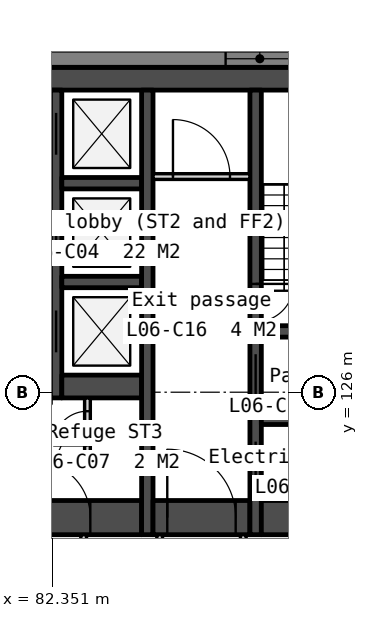
"""IFC4 building model, lengths in metres.
Left out: names, types, materials, properties, quantities, classifications, styles, units other than length and angle.
Written with IfcOpenShell. Run it as: python <this file> out.ifc"""

import sys

from ifc_helpers import new_model, si_unit, direction, frame, frame_2d, origin, place, context, subcontext, project, spatial, polyline, rectangle, outline, extrude, element, fill, save


model = new_model("IFC4")
c1 = context("Model", 3, precision=1e-05, world=origin(), true_north=direction((0.0, 1.0)))
c2 = subcontext(c1, "Body", "Model", "MODEL_VIEW")
j1 = project(units=[si_unit("LENGTHUNIT", "METRE"), si_unit("PLANEANGLEUNIT", "RADIAN")], contexts=[c1])
p1 = place(None, origin())
s1 = spatial("IfcSite", under=j1, at=p1, CompositionType="ELEMENT")
p2 = place(p1, origin())
s2 = spatial("IfcBuilding", under=s1, at=p2, CompositionType="ELEMENT")
p3 = place(p2, frame((0.0, 0.0, 35.0)))
s3 = spatial("IfcBuildingStorey", under=s2, at=p3, CompositionType="ELEMENT", Elevation=35.0)
p4 = place(p3, frame((66.0, 134.25, 0.0), z_axis=(0.0, 0.0, 1.0), x_axis=(1.0, 0.0, 0.0)))
e1 = element("IfcWall", 1, at=p4, inside=s3, PredefinedType="SOLIDWALL", context=c2, shape_type="SweptSolid", body=[
    extrude(rectangle(XDim=28.0, YDim=0.6, at=frame_2d((14.0, 0.0))), origin(), (0.0, 0.0, 1.0), 3.35),
])
p5 = place(p3, frame((81.8, 122.7, 0.0), z_axis=(0.0, 0.0, 1.0), x_axis=(1.0, 0.0, 0.0)))
e2 = element("IfcWall", 2, at=p5, inside=s3, PredefinedType="SOLIDWALL", context=c2, shape_type="SweptSolid", body=[
    extrude(rectangle(XDim=2.9, YDim=0.9, at=frame_2d((1.45, 0.0))), origin(), (0.0, 0.0, 1.0), 3.35),
])
p6 = place(p5, frame((0.05, 0.0, 0.0)))
e3 = element("IfcOpeningElement", 3, at=p6, cuts=e2, PredefinedType="OPENING", context=c2, shape_type="SweptSolid", body=[
    extrude(rectangle(XDim=1.5, YDim=2.1, at=frame_2d((0.75, 1.05))), frame((0.0, 0.46, 0.0), z_axis=(0.0, -1.0, 0.0), x_axis=(1.0, 0.0, 0.0)), (0.0, 0.0, 1.0), 0.92),
])
p7 = place(p3, frame((82.45, 133.95, 0.0), z_axis=(0.0, 0.0, 1.0), x_axis=(0.0, -1.0, 0.0)))
e4 = element("IfcWall", 4, at=p7, inside=s3, PredefinedType="SOLIDWALL", context=c2, shape_type="SweptSolid", body=[
    extrude(rectangle(XDim=8.1, YDim=0.3, at=frame_2d((4.05, 0.0))), origin(), (0.0, 0.0, 1.0), 3.35),
])
p8 = place(p7, frame((0.6, 0.0, 0.0)))
e5 = element("IfcOpeningElement", 5, at=p8, cuts=e4, PredefinedType="OPENING", context=c2, shape_type="SweptSolid", body=[
    extrude(rectangle(XDim=1.1, YDim=2.1, at=frame_2d((0.55, 1.05))), frame((0.0, 0.16, 0.0), z_axis=(0.0, -1.0, 0.0), x_axis=(1.0, 0.0, 0.0)), (0.0, 0.0, 1.0), 0.32),
])
p9 = place(p7, frame((3.2, 0.0, 0.0)))
e6 = element("IfcOpeningElement", 6, at=p9, cuts=e4, PredefinedType="OPENING", context=c2, shape_type="SweptSolid", body=[
    extrude(rectangle(XDim=1.1, YDim=2.1, at=frame_2d((0.55, 1.05))), frame((0.0, 0.16, 0.0), z_axis=(0.0, -1.0, 0.0), x_axis=(1.0, 0.0, 0.0)), (0.0, 0.0, 1.0), 0.32),
])
p10 = place(p7, frame((5.8, 0.0, 0.0)))
e7 = element("IfcOpeningElement", 7, at=p10, cuts=e4, PredefinedType="OPENING", context=c2, shape_type="SweptSolid", body=[
    extrude(rectangle(XDim=1.1, YDim=2.1, at=frame_2d((0.55, 1.05))), frame((0.0, 0.16, 0.0), z_axis=(0.0, -1.0, 0.0), x_axis=(1.0, 0.0, 0.0)), (0.0, 0.0, 1.0), 0.32),
])
for number, where, z_axis, x_axis in (
    (8, (82.6, 131.5, 0.0), (0.0, 0.0, 1.0), (1.0, 0.0, 0.0)),
    (9, (82.6, 128.9, 0.0), (0.0, 0.0, 1.0), (1.0, 0.0, 0.0)),
):
    element("IfcWall", number, at=place(p3, frame(where, z_axis=z_axis, x_axis=x_axis)), inside=s3, PredefinedType="SOLIDWALL", context=c2, shape_type="SweptSolid", body=[
        extrude(rectangle(XDim=2.1, YDim=0.3, at=frame_2d((1.05, 0.0))), origin(), (0.0, 0.0, 1.0), 3.35),
    ])
p11 = place(p3, frame((82.6, 126.15, 0.0), z_axis=(0.0, 0.0, 1.0), x_axis=(1.0, 0.0, 0.0)))
e10 = element("IfcWall", 10, at=p11, inside=s3, PredefinedType="SOLIDWALL", context=c2, shape_type="SweptSolid", body=[
    extrude(rectangle(XDim=2.1, YDim=0.6, at=frame_2d((1.05, 0.0))), origin(), (0.0, 0.0, 1.0), 3.35),
])
p12 = place(p3, frame((83.175, 122.25, 0.0), z_axis=(0.0, 0.0, 1.0), x_axis=(0.0, -1.0, 0.0)))
e11 = element("IfcWall", 11, at=p12, inside=s3, PredefinedType="PARTITIONING", context=c2, shape_type="SweptSolid", body=[
    extrude(rectangle(XDim=2.1, YDim=0.15, at=frame_2d((1.05, 0.0))), origin(), (0.0, 0.0, 1.0), 3.35),
])
p13 = place(p3, frame((83.275, 125.85, 0.0), z_axis=(0.0, 0.0, 1.0), x_axis=(0.0, -1.0, 0.0)))
e12 = element("IfcWall", 12, at=p13, inside=s3, PredefinedType="PARTITIONING", context=c2, shape_type="SweptSolid", body=[
    extrude(rectangle(XDim=1.75, YDim=0.15, at=frame_2d((0.875, 0.0))), origin(), (0.0, 0.0, 1.0), 3.35),
])
p14 = place(p13, frame((0.35, 0.0, 0.0)))
e13 = element("IfcOpeningElement", 13, at=p14, cuts=e12, PredefinedType="OPENING", context=c2, shape_type="SweptSolid", body=[
    extrude(rectangle(XDim=0.9, YDim=2.1, at=frame_2d((0.45, 1.05))), frame((0.0, 0.085, 0.0), z_axis=(0.0, -1.0, 0.0), x_axis=(1.0, 0.0, 0.0)), (0.0, 0.0, 1.0), 0.17),
])
p15 = place(p3, frame((83.35, 124.175, 0.0), z_axis=(0.0, 0.0, 1.0), x_axis=(1.0, 0.0, 0.0)))
e14 = element("IfcWall", 14, at=p15, inside=s3, PredefinedType="PARTITIONING", context=c2, shape_type="SweptSolid", body=[
    extrude(rectangle(XDim=1.35, YDim=0.15, at=frame_2d((0.675, 0.0))), origin(), (0.0, 0.0, 1.0), 3.35),
])
p16 = place(p3, frame((84.85, 133.95, 0.0), z_axis=(0.0, 0.0, 1.0), x_axis=(0.0, -1.0, 0.0)))
e15 = element("IfcWall", 15, at=p16, inside=s3, PredefinedType="SOLIDWALL", context=c2, shape_type="SweptSolid", body=[
    extrude(rectangle(XDim=11.7, YDim=0.3, at=frame_2d((5.85, 0.0))), origin(), (0.0, 0.0, 1.0), 3.35),
])
p17 = place(p3, frame((85.0, 131.675, 0.0), z_axis=(0.0, 0.0, 1.0), x_axis=(1.0, 0.0, 0.0)))
e16 = element("IfcWall", 16, at=p17, inside=s3, PredefinedType="PARTITIONING", context=c2, shape_type="SweptSolid", body=[
    extrude(rectangle(XDim=2.55, YDim=0.15, at=frame_2d((1.275, 0.0))), origin(), (0.0, 0.0, 1.0), 3.35),
])
p18 = place(p17, frame((0.525, 0.0, 0.0)))
e17 = element("IfcOpeningElement", 17, at=p18, cuts=e16, PredefinedType="OPENING", context=c2, shape_type="SweptSolid", body=[
    extrude(rectangle(XDim=1.5, YDim=2.1, at=frame_2d((0.75, 1.05))), frame((0.0, 0.085, 0.0), z_axis=(0.0, -1.0, 0.0), x_axis=(1.0, 0.0, 0.0)), (0.0, 0.0, 1.0), 0.17),
])
p19 = place(p3, frame((85.0, 122.7, 0.0), z_axis=(0.0, 0.0, 1.0), x_axis=(1.0, 0.0, 0.0)))
e18 = element("IfcWall", 18, at=p19, inside=s3, PredefinedType="SOLIDWALL", context=c2, shape_type="SweptSolid", body=[
    extrude(rectangle(XDim=2.55, YDim=0.9, at=frame_2d((1.275, 0.0))), origin(), (0.0, 0.0, 1.0), 3.35),
])
p20 = place(p19, frame((0.375, 0.0, 0.0)))
e19 = element("IfcOpeningElement", 19, at=p20, cuts=e18, PredefinedType="OPENING", context=c2, shape_type="SweptSolid", body=[
    extrude(rectangle(XDim=1.8, YDim=2.1, at=frame_2d((0.9, 1.05))), frame((0.0, 0.46, 0.0), z_axis=(0.0, -1.0, 0.0), x_axis=(1.0, 0.0, 0.0)), (0.0, 0.0, 1.0), 0.92),
])
p21 = place(p3, frame((85.175, 122.25, 0.0), z_axis=(0.0, 0.0, 1.0), x_axis=(0.0, -1.0, 0.0)))
e20 = element("IfcWall", 20, at=p21, inside=s3, PredefinedType="PARTITIONING", context=c2, shape_type="SweptSolid", body=[
    extrude(rectangle(XDim=2.1, YDim=0.15, at=frame_2d((1.05, 0.0))), origin(), (0.0, 0.0, 1.0), 3.35),
])
p22 = place(p21, frame((0.55, 0.0, 0.0)))
e21 = element("IfcOpeningElement", 21, at=p22, cuts=e20, PredefinedType="OPENING", context=c2, shape_type="SweptSolid", body=[
    extrude(rectangle(XDim=1.0, YDim=2.1, at=frame_2d((0.5, 1.05))), frame((0.0, 0.085, 0.0), z_axis=(0.0, -1.0, 0.0), x_axis=(1.0, 0.0, 0.0)), (0.0, 0.0, 1.0), 0.17),
])
p23 = place(p3, frame((87.375, 122.25, 0.0), z_axis=(0.0, 0.0, 1.0), x_axis=(0.0, -1.0, 0.0)))
e22 = element("IfcWall", 22, at=p23, inside=s3, PredefinedType="PARTITIONING", context=c2, shape_type="SweptSolid", body=[
    extrude(rectangle(XDim=2.1, YDim=0.15, at=frame_2d((1.05, 0.0))), origin(), (0.0, 0.0, 1.0), 3.35),
])
p24 = place(p3, frame((87.7, 133.95, 0.0), z_axis=(0.0, 0.0, 1.0), x_axis=(0.0, -1.0, 0.0)))
e23 = element("IfcWall", 23, at=p24, inside=s3, PredefinedType="SOLIDWALL", context=c2, shape_type="SweptSolid", body=[
    extrude(rectangle(XDim=11.7, YDim=0.3, at=frame_2d((5.85, 0.0))), origin(), (0.0, 0.0, 1.0), 3.35),
])
p25 = place(p24, frame((6.95, 0.0, 0.0)))
e24 = element("IfcOpeningElement", 24, at=p25, cuts=e23, PredefinedType="OPENING", context=c2, shape_type="SweptSolid", body=[
    extrude(rectangle(XDim=1.1, YDim=2.1, at=frame_2d((0.55, 1.05))), frame((0.0, 0.16, 0.0), z_axis=(0.0, -1.0, 0.0), x_axis=(1.0, 0.0, 0.0)), (0.0, 0.0, 1.0), 0.32),
])
p26 = place(p24, frame((5.1, 0.0, 0.0)))
e25 = element("IfcOpeningElement", 25, at=p26, cuts=e23, PredefinedType="OPENING", context=c2, shape_type="SweptSolid", body=[
    extrude(rectangle(XDim=1.0, YDim=2.1, at=frame_2d((0.5, 1.05))), frame((0.0, 0.16, 0.0), z_axis=(0.0, -1.0, 0.0), x_axis=(1.0, 0.0, 0.0)), (0.0, 0.0, 1.0), 0.32),
])
p27 = place(p24, frame((9.25, 0.0, 0.0)))
e26 = element("IfcOpeningElement", 26, at=p27, cuts=e23, PredefinedType="OPENING", context=c2, shape_type="SweptSolid", body=[
    extrude(rectangle(XDim=1.1, YDim=2.1, at=frame_2d((0.55, 1.05))), frame((0.0, 0.16, 0.0), z_axis=(0.0, -1.0, 0.0), x_axis=(1.0, 0.0, 0.0)), (0.0, 0.0, 1.0), 0.32),
])
for number, where, z_axis, x_axis in (
    (27, (87.85, 127.6, 0.0), (0.0, 0.0, 1.0), (1.0, 0.0, 0.0)),
    (28, (87.85, 125.3, 0.0), (0.0, 0.0, 1.0), (1.0, 0.0, 0.0)),
):
    element("IfcWall", number, at=place(p3, frame(where, z_axis=z_axis, x_axis=x_axis)), inside=s3, PredefinedType="SOLIDWALL", context=c2, shape_type="SweptSolid", body=[
        extrude(rectangle(XDim=2.55, YDim=0.3, at=frame_2d((1.275, 0.0))), origin(), (0.0, 0.0, 1.0), 3.35),
    ])
p28 = place(p3, frame((87.85, 122.7, 0.0), z_axis=(0.0, 0.0, 1.0), x_axis=(1.0, 0.0, 0.0)))
e29 = element("IfcWall", 29, at=p28, inside=s3, PredefinedType="SOLIDWALL", context=c2, shape_type="SweptSolid", body=[
    extrude(rectangle(XDim=2.55, YDim=0.9, at=frame_2d((1.275, 0.0))), origin(), (0.0, 0.0, 1.0), 3.35),
])
p29 = place(p3, frame((102.4, 134.775, -0.2), z_axis=(0.0, 0.0, 1.0), x_axis=(-1.0, 0.0, 0.0)))
e30 = element("IfcWall", 30, at=p29, inside=s3, PredefinedType="SOLIDWALL", context=c2, shape_type="SweptSolid", body=[
    extrude(outline(polyline([(44.8, 0.0), (44.8, 3.55), (0.0, 3.55), (0.0, 0.0), (44.8, 0.0)])), frame((0.0, 0.225, 0.0), z_axis=(0.0, -1.0, 0.0), x_axis=(1.0, 0.0, 0.0)), (0.0, 0.0, 1.0), 0.45),
])
p30 = place(p29, frame((2.43, 0.0, 1.1)))
e31 = element("IfcOpeningElement", 31, at=p30, cuts=e30, PredefinedType="OPENING", context=c2, shape_type="SweptSolid", body=[
    extrude(rectangle(XDim=1.8, YDim=1.5, at=frame_2d((0.9, 0.75))), frame((0.0, 0.235, 0.0), z_axis=(0.0, -1.0, 0.0), x_axis=(1.0, 0.0, 0.0)), (0.0, 0.0, 1.0), 0.47),
])
p31 = place(p29, frame((4.73, 0.0, 1.1)))
e32 = element("IfcOpeningElement", 32, at=p31, cuts=e30, PredefinedType="OPENING", context=c2, shape_type="SweptSolid", body=[
    extrude(rectangle(XDim=1.8, YDim=1.5, at=frame_2d((0.9, 0.75))), frame((0.0, 0.235, 0.0), z_axis=(0.0, -1.0, 0.0), x_axis=(1.0, 0.0, 0.0)), (0.0, 0.0, 1.0), 0.47),
])
p32 = place(p29, frame((11.39, 0.0, 1.1)))
e33 = element("IfcOpeningElement", 33, at=p32, cuts=e30, PredefinedType="OPENING", context=c2, shape_type="SweptSolid", body=[
    extrude(rectangle(XDim=1.8, YDim=1.5, at=frame_2d((0.9, 0.75))), frame((0.0, 0.235, 0.0), z_axis=(0.0, -1.0, 0.0), x_axis=(1.0, 0.0, 0.0)), (0.0, 0.0, 1.0), 0.47),
])
p33 = place(p29, frame((13.69, 0.0, 1.1)))
e34 = element("IfcOpeningElement", 34, at=p33, cuts=e30, PredefinedType="OPENING", context=c2, shape_type="SweptSolid", body=[
    extrude(rectangle(XDim=1.8, YDim=1.5, at=frame_2d((0.9, 0.75))), frame((0.0, 0.235, 0.0), z_axis=(0.0, -1.0, 0.0), x_axis=(1.0, 0.0, 0.0)), (0.0, 0.0, 1.0), 0.47),
])
p34 = place(p29, frame((20.35, 0.0, 1.1)))
e35 = element("IfcOpeningElement", 35, at=p34, cuts=e30, PredefinedType="OPENING", context=c2, shape_type="SweptSolid", body=[
    extrude(rectangle(XDim=1.8, YDim=1.5, at=frame_2d((0.9, 0.75))), frame((0.0, 0.235, 0.0), z_axis=(0.0, -1.0, 0.0), x_axis=(1.0, 0.0, 0.0)), (0.0, 0.0, 1.0), 0.47),
])
p35 = place(p29, frame((22.65, 0.0, 1.1)))
e36 = element("IfcOpeningElement", 36, at=p35, cuts=e30, PredefinedType="OPENING", context=c2, shape_type="SweptSolid", body=[
    extrude(rectangle(XDim=1.8, YDim=1.5, at=frame_2d((0.9, 0.75))), frame((0.0, 0.235, 0.0), z_axis=(0.0, -1.0, 0.0), x_axis=(1.0, 0.0, 0.0)), (0.0, 0.0, 1.0), 0.47),
])
p36 = place(p29, frame((29.31, 0.0, 1.1)))
e37 = element("IfcOpeningElement", 37, at=p36, cuts=e30, PredefinedType="OPENING", context=c2, shape_type="SweptSolid", body=[
    extrude(rectangle(XDim=1.8, YDim=1.5, at=frame_2d((0.9, 0.75))), frame((0.0, 0.235, 0.0), z_axis=(0.0, -1.0, 0.0), x_axis=(1.0, 0.0, 0.0)), (0.0, 0.0, 1.0), 0.47),
])
p37 = place(p29, frame((31.61, 0.0, 1.1)))
e38 = element("IfcOpeningElement", 38, at=p37, cuts=e30, PredefinedType="OPENING", context=c2, shape_type="SweptSolid", body=[
    extrude(rectangle(XDim=1.8, YDim=1.5, at=frame_2d((0.9, 0.75))), frame((0.0, 0.235, 0.0), z_axis=(0.0, -1.0, 0.0), x_axis=(1.0, 0.0, 0.0)), (0.0, 0.0, 1.0), 0.47),
])
p38 = place(p29, frame((38.27, 0.0, 1.1)))
e39 = element("IfcOpeningElement", 39, at=p38, cuts=e30, PredefinedType="OPENING", context=c2, shape_type="SweptSolid", body=[
    extrude(rectangle(XDim=1.8, YDim=1.5, at=frame_2d((0.9, 0.75))), frame((0.0, 0.235, 0.0), z_axis=(0.0, -1.0, 0.0), x_axis=(1.0, 0.0, 0.0)), (0.0, 0.0, 1.0), 0.47),
])
p39 = place(p29, frame((40.57, 0.0, 1.1)))
e40 = element("IfcOpeningElement", 40, at=p39, cuts=e30, PredefinedType="OPENING", context=c2, shape_type="SweptSolid", body=[
    extrude(rectangle(XDim=1.8, YDim=1.5, at=frame_2d((0.9, 0.75))), frame((0.0, 0.235, 0.0), z_axis=(0.0, -1.0, 0.0), x_axis=(1.0, 0.0, 0.0)), (0.0, 0.0, 1.0), 0.47),
])
p40 = place(p3, frame((83.105, 90.599, -0.2), z_axis=(0.0, 0.0, 1.0), x_axis=(0.499999201451, 0.866025864826, 0.0)))
e41 = element("IfcWall", 41, at=p40, inside=s3, PredefinedType="SOLIDWALL", context=c2, shape_type="SweptSolid", body=[
    extrude(outline(polyline([(44.8, 0.0), (44.8, 3.55), (0.0, 3.55), (0.0, 0.0), (44.8, 0.0)])), frame((0.0, 0.225, 0.0), z_axis=(0.0, -1.0, 0.0), x_axis=(1.0, 0.0, 0.0)), (0.0, 0.0, 1.0), 0.45),
])
p41 = place(p40, frame((2.43, 0.0, 1.1)))
e42 = element("IfcOpeningElement", 42, at=p41, cuts=e41, PredefinedType="OPENING", context=c2, shape_type="SweptSolid", body=[
    extrude(rectangle(XDim=1.8, YDim=1.5, at=frame_2d((0.9, 0.75))), frame((0.0, 0.235, 0.0), z_axis=(0.0, -1.0, 0.0), x_axis=(1.0, 0.0, 0.0)), (0.0, 0.0, 1.0), 0.47),
])
p42 = place(p40, frame((4.73, 0.0, 0.2)))
e43 = element("IfcOpeningElement", 43, at=p42, cuts=e41, PredefinedType="OPENING", context=c2, shape_type="SweptSolid", body=[
    extrude(rectangle(XDim=1.8, YDim=2.4, at=frame_2d((0.9, 1.2))), frame((0.0, 0.235, 0.0), z_axis=(0.0, -1.0, 0.0), x_axis=(1.0, 0.0, 0.0)), (0.0, 0.0, 1.0), 0.47),
])
p43 = place(p40, frame((11.39, 0.0, 1.1)))
e44 = element("IfcOpeningElement", 44, at=p43, cuts=e41, PredefinedType="OPENING", context=c2, shape_type="SweptSolid", body=[
    extrude(rectangle(XDim=1.8, YDim=1.5, at=frame_2d((0.9, 0.75))), frame((0.0, 0.235, 0.0), z_axis=(0.0, -1.0, 0.0), x_axis=(1.0, 0.0, 0.0)), (0.0, 0.0, 1.0), 0.47),
])
p44 = place(p40, frame((13.69, 0.0, 1.1)))
e45 = element("IfcOpeningElement", 45, at=p44, cuts=e41, PredefinedType="OPENING", context=c2, shape_type="SweptSolid", body=[
    extrude(rectangle(XDim=1.8, YDim=1.5, at=frame_2d((0.9, 0.75))), frame((0.0, 0.235, 0.0), z_axis=(0.0, -1.0, 0.0), x_axis=(1.0, 0.0, 0.0)), (0.0, 0.0, 1.0), 0.47),
])
p45 = place(p40, frame((20.35, 0.0, 0.2)))
e46 = element("IfcOpeningElement", 46, at=p45, cuts=e41, PredefinedType="OPENING", context=c2, shape_type="SweptSolid", body=[
    extrude(rectangle(XDim=1.8, YDim=2.4, at=frame_2d((0.9, 1.2))), frame((0.0, 0.235, 0.0), z_axis=(0.0, -1.0, 0.0), x_axis=(1.0, 0.0, 0.0)), (0.0, 0.0, 1.0), 0.47),
])
p46 = place(p40, frame((22.65, 0.0, 1.1)))
e47 = element("IfcOpeningElement", 47, at=p46, cuts=e41, PredefinedType="OPENING", context=c2, shape_type="SweptSolid", body=[
    extrude(rectangle(XDim=1.8, YDim=1.5, at=frame_2d((0.9, 0.75))), frame((0.0, 0.235, 0.0), z_axis=(0.0, -1.0, 0.0), x_axis=(1.0, 0.0, 0.0)), (0.0, 0.0, 1.0), 0.47),
])
p47 = place(p40, frame((29.31, 0.0, 1.1)))
e48 = element("IfcOpeningElement", 48, at=p47, cuts=e41, PredefinedType="OPENING", context=c2, shape_type="SweptSolid", body=[
    extrude(rectangle(XDim=1.8, YDim=1.5, at=frame_2d((0.9, 0.75))), frame((0.0, 0.235, 0.0), z_axis=(0.0, -1.0, 0.0), x_axis=(1.0, 0.0, 0.0)), (0.0, 0.0, 1.0), 0.47),
])
p48 = place(p40, frame((31.61, 0.0, 0.2)))
e49 = element("IfcOpeningElement", 49, at=p48, cuts=e41, PredefinedType="OPENING", context=c2, shape_type="SweptSolid", body=[
    extrude(rectangle(XDim=1.8, YDim=2.4, at=frame_2d((0.9, 1.2))), frame((0.0, 0.235, 0.0), z_axis=(0.0, -1.0, 0.0), x_axis=(1.0, 0.0, 0.0)), (0.0, 0.0, 1.0), 0.47),
])
p49 = place(p40, frame((38.27, 0.0, 1.1)))
e50 = element("IfcOpeningElement", 50, at=p49, cuts=e41, PredefinedType="OPENING", context=c2, shape_type="SweptSolid", body=[
    extrude(rectangle(XDim=1.8, YDim=1.5, at=frame_2d((0.9, 0.75))), frame((0.0, 0.235, 0.0), z_axis=(0.0, -1.0, 0.0), x_axis=(1.0, 0.0, 0.0)), (0.0, 0.0, 1.0), 0.47),
])
p50 = place(p40, frame((40.57, 0.0, 1.1)))
e51 = element("IfcOpeningElement", 51, at=p50, cuts=e41, PredefinedType="OPENING", context=c2, shape_type="SweptSolid", body=[
    extrude(rectangle(XDim=1.8, YDim=1.5, at=frame_2d((0.9, 0.75))), frame((0.0, 0.235, 0.0), z_axis=(0.0, -1.0, 0.0), x_axis=(1.0, 0.0, 0.0)), (0.0, 0.0, 1.0), 0.47),
])
p51 = place(p3, frame((110.208, 129.091, 0.0), z_axis=(0.0, 0.0, 1.0), x_axis=(-0.500001932243, -0.8660242882, 0.0)))
e52 = element("IfcWall", 52, at=p51, inside=s3, PredefinedType="STANDARD", context=c2, shape_type="SweptSolid", body=[
    extrude(rectangle(XDim=54.747, YDim=1.0, at=frame_2d((27.374, 0.0))), origin(), (0.0, 0.0, 1.0), 0.6),
])
p52 = place(p8, origin())
e53 = element("IfcDoor", 53, at=p52, inside=s3, OperationType="SLIDING_TO_LEFT", PredefinedType="DOOR", context=c2, shape_type="SweptSolid", body=[
    extrude(rectangle(XDim=1.1, YDim=2.1, at=frame_2d((0.55, 1.05))), frame((0.0, 0.025, 0.0), z_axis=(0.0, -1.0, 0.0), x_axis=(1.0, 0.0, 0.0)), (0.0, 0.0, 1.0), 0.05),
])
fill(e5, e53)
p53 = place(p9, origin())
e54 = element("IfcDoor", 54, at=p53, inside=s3, OperationType="SLIDING_TO_LEFT", PredefinedType="DOOR", context=c2, shape_type="SweptSolid", body=[
    extrude(rectangle(XDim=1.1, YDim=2.1, at=frame_2d((0.55, 1.05))), frame((0.0, 0.025, 0.0), z_axis=(0.0, -1.0, 0.0), x_axis=(1.0, 0.0, 0.0)), (0.0, 0.0, 1.0), 0.05),
])
fill(e6, e54)
p54 = place(p10, origin())
e55 = element("IfcDoor", 55, at=p54, inside=s3, OperationType="SLIDING_TO_LEFT", PredefinedType="DOOR", context=c2, shape_type="SweptSolid", body=[
    extrude(rectangle(XDim=1.1, YDim=2.1, at=frame_2d((0.55, 1.05))), frame((0.0, 0.025, 0.0), z_axis=(0.0, -1.0, 0.0), x_axis=(1.0, 0.0, 0.0)), (0.0, 0.0, 1.0), 0.05),
])
fill(e7, e55)
p55 = place(p25, origin())
e56 = element("IfcDoor", 56, at=p55, inside=s3, OperationType="SLIDING_TO_LEFT", PredefinedType="DOOR", context=c2, shape_type="SweptSolid", body=[
    extrude(rectangle(XDim=1.1, YDim=2.1, at=frame_2d((0.55, 1.05))), frame((0.0, 0.025, 0.0), z_axis=(0.0, -1.0, 0.0), x_axis=(1.0, 0.0, 0.0)), (0.0, 0.0, 1.0), 0.05),
])
fill(e24, e56)
p56 = place(p20, origin())
e57 = element("IfcDoor", 57, at=p56, inside=s3, OperationType="DOUBLE_DOOR_DOUBLE_SWING", PredefinedType="DOOR", context=c2, shape_type="SweptSolid", body=[
    extrude(rectangle(XDim=1.8, YDim=2.1, at=frame_2d((0.9, 1.05))), frame((0.0, 0.025, 0.0), z_axis=(0.0, -1.0, 0.0), x_axis=(1.0, 0.0, 0.0)), (0.0, 0.0, 1.0), 0.05),
])
fill(e19, e57)
p57 = place(p6, origin())
e58 = element("IfcDoor", 58, at=p57, inside=s3, OperationType="DOUBLE_DOOR_DOUBLE_SWING", PredefinedType="DOOR", context=c2, shape_type="SweptSolid", body=[
    extrude(rectangle(XDim=1.5, YDim=2.1, at=frame_2d((0.75, 1.05))), frame((0.0, 0.025, 0.0), z_axis=(0.0, -1.0, 0.0), x_axis=(1.0, 0.0, 0.0)), (0.0, 0.0, 1.0), 0.05),
])
fill(e3, e58)
p58 = place(p14, origin())
e59 = element("IfcDoor", 59, at=p58, inside=s3, OperationType="SINGLE_SWING_RIGHT", PredefinedType="DOOR", context=c2, shape_type="SweptSolid", body=[
    extrude(rectangle(XDim=0.9, YDim=2.1, at=frame_2d((0.45, 1.05))), frame((0.0, 0.025, 0.0), z_axis=(0.0, -1.0, 0.0), x_axis=(1.0, 0.0, 0.0)), (0.0, 0.0, 1.0), 0.05),
])
fill(e13, e59)
p59 = place(p18, origin())
e60 = element("IfcDoor", 60, at=p59, inside=s3, OperationType="DOUBLE_DOOR_DOUBLE_SWING", PredefinedType="DOOR", context=c2, shape_type="SweptSolid", body=[
    extrude(rectangle(XDim=1.5, YDim=2.1, at=frame_2d((0.75, 1.05))), frame((0.0, 0.025, 0.0), z_axis=(0.0, -1.0, 0.0), x_axis=(1.0, 0.0, 0.0)), (0.0, 0.0, 1.0), 0.05),
])
fill(e17, e60)
p60 = place(p26, origin())
e61 = element("IfcDoor", 61, at=p60, inside=s3, OperationType="SINGLE_SWING_LEFT", PredefinedType="DOOR", context=c2, shape_type="SweptSolid", body=[
    extrude(rectangle(XDim=1.0, YDim=2.1, at=frame_2d((0.5, 1.05))), frame((0.0, 0.025, 0.0), z_axis=(0.0, -1.0, 0.0), x_axis=(1.0, 0.0, 0.0)), (0.0, 0.0, 1.0), 0.05),
])
fill(e25, e61)
p61 = place(p27, origin())
e62 = element("IfcDoor", 62, at=p61, inside=s3, OperationType="SLIDING_TO_LEFT", PredefinedType="DOOR", context=c2, shape_type="SweptSolid", body=[
    extrude(rectangle(XDim=1.1, YDim=2.1, at=frame_2d((0.55, 1.05))), frame((0.0, 0.025, 0.0), z_axis=(0.0, -1.0, 0.0), x_axis=(1.0, 0.0, 0.0)), (0.0, 0.0, 1.0), 0.05),
])
fill(e26, e62)
p62 = place(p33, origin())
e63 = element("IfcWindow", 63, at=p62, inside=s3, PartitioningType="SINGLE_PANEL", PredefinedType="WINDOW", context=c2, shape_type="SweptSolid", body=[
    extrude(rectangle(XDim=1.8, YDim=1.5, at=frame_2d((0.9, 0.75))), frame((0.0, 0.03, 0.0), z_axis=(0.0, -1.0, 0.0), x_axis=(1.0, 0.0, 0.0)), (0.0, 0.0, 1.0), 0.06),
])
fill(e34, e63)
save(model, sys.argv[1])
